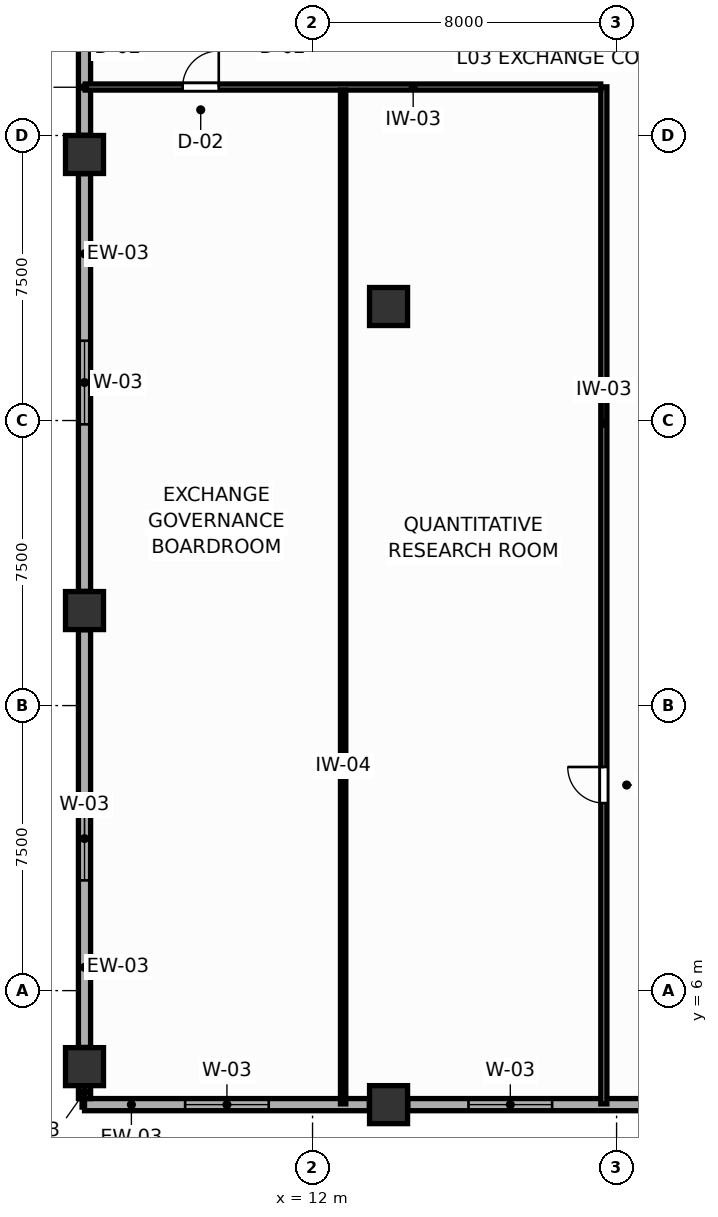
"""IFC4 building model, lengths in metres.
Left out: names, types, materials, properties, quantities, classifications, styles, units other than length and angle.
Written with IfcOpenShell. Run it as: python <this file> out.ifc"""

import sys

from ifc_helpers import new_model, si_unit, direction, frame, frame_2d, origin, origin_2d, place, context, subcontext, project, spatial, rectangle, extrude, source, transform, mapped, element, fill, save


model = new_model("IFC4")
c1 = context("Model", 3, precision=1e-05, world=origin(), true_north=direction((0.0, 1.0)))
c2 = subcontext(c1, "Body", "Model", "MODEL_VIEW")
j1 = project(units=[si_unit("LENGTHUNIT", "METRE"), si_unit("PLANEANGLEUNIT", "RADIAN")], contexts=[c1])
p1 = place(None, origin())
s1 = spatial("IfcSite", under=j1, at=p1, CompositionType="ELEMENT")
p2 = place(p1, origin())
s2 = spatial("IfcBuilding", under=s1, at=p2, CompositionType="ELEMENT")
p3 = place(p2, frame((0.0, 0.0, 14.4)))
s3 = spatial("IfcBuildingStorey", under=s2, at=p3, CompositionType="ELEMENT", Elevation=14.4)
m1 = source(origin(), c2, "Body", "SweptSolid", [
    extrude(rectangle(XDim=1.0, YDim=1.0, at=origin_2d()), origin(), (0.0, 0.0, 1.0), 4.8),
])
for number, where, z_axis, x_axis in (
    (1, (6.0, 4.0, 0.0), (0.0, 0.0, 1.0), (1.0, 0.0, 0.0)),
    (2, (6.0, 16.0, 0.0), (0.0, 0.0, 1.0), (1.0, 0.0, 0.0)),
    (3, (6.0, 28.0, 0.0), (0.0, 0.0, 1.0), (1.0, 0.0, 0.0)),
    (4, (14.0, 3.0, 0.0), (0.0, 0.0, 1.0), (1.0, 0.0, 0.0)),
    (5, (14.0, 24.0, 0.0), (0.0, 0.0, 1.0), (1.0, 0.0, 0.0)),
):
    element("IfcColumn", number, at=place(p3, frame(where, z_axis=z_axis, x_axis=x_axis)), inside=s3, PredefinedType="COLUMN", context=c2, shape_type="MappedRepresentation", body=[
        mapped(m1, transform((0.0, 0.0, 0.0), scale=1.0)),
    ])
p4 = place(p3, frame((6.0, 3.0, 0.0), z_axis=(0.0, 0.0, 1.0), x_axis=(1.0, 0.0, 0.0)))
e6 = element("IfcWall", 6, at=p4, inside=s3, PredefinedType="SOLIDWALL", context=c2, shape_type="SweptSolid", body=[
    extrude(rectangle(XDim=7.495, YDim=0.32, at=frame_2d((3.748, 0.0))), origin(), (0.0, 0.0, 1.0), 3.82),
])
p5 = place(p4, frame((2.647, 0.0, 0.75)))
e7 = element("IfcOpeningElement", 7, at=p5, cuts=e6, PredefinedType="OPENING", context=c2, shape_type="SweptSolid", body=[
    extrude(rectangle(XDim=2.2, YDim=2.0, at=frame_2d((1.1, 1.0))), frame((0.0, 0.17, 0.0), z_axis=(0.0, -1.0, 0.0), x_axis=(1.0, 0.0, 0.0)), (0.0, 0.0, 1.0), 0.34),
])
p6 = place(p3, frame((14.505, 3.0, 0.0), z_axis=(0.0, 0.0, 1.0), x_axis=(1.0, 0.0, 0.0)))
e8 = element("IfcWall", 8, at=p6, inside=s3, PredefinedType="SOLIDWALL", context=c2, shape_type="SweptSolid", body=[
    extrude(rectangle(XDim=12.59, YDim=0.32, at=frame_2d((6.295, 0.0))), origin(), (0.0, 0.0, 1.0), 3.82),
])
p7 = place(p6, frame((1.599, 0.0, 0.75)))
e9 = element("IfcOpeningElement", 9, at=p7, cuts=e8, PredefinedType="OPENING", context=c2, shape_type="SweptSolid", body=[
    extrude(rectangle(XDim=2.2, YDim=2.0, at=frame_2d((1.1, 1.0))), frame((0.0, 0.17, 0.0), z_axis=(0.0, -1.0, 0.0), x_axis=(1.0, 0.0, 0.0)), (0.0, 0.0, 1.0), 0.34),
])
p8 = place(p3, frame((6.0, 3.16, 0.0), z_axis=(0.0, 0.0, 1.0), x_axis=(0.0, 1.0, 0.0)))
e10 = element("IfcWall", 10, at=p8, inside=s3, PredefinedType="SOLIDWALL", context=c2, shape_type="SweptSolid", body=[
    extrude(rectangle(XDim=0.335, YDim=0.32, at=frame_2d((0.167, 0.0))), origin(), (0.0, 0.0, 1.0), 4.52),
])
p9 = place(p3, frame((6.0, 4.505, 0.0), z_axis=(0.0, 0.0, 1.0), x_axis=(0.0, 1.0, 0.0)))
e11 = element("IfcWall", 11, at=p9, inside=s3, PredefinedType="SOLIDWALL", context=c2, shape_type="SweptSolid", body=[
    extrude(rectangle(XDim=10.99, YDim=0.32, at=frame_2d((5.495, 0.0))), origin(), (0.0, 0.0, 1.0), 3.82),
])
p10 = place(p9, frame((4.395, 0.0, 0.75)))
e12 = element("IfcOpeningElement", 12, at=p10, cuts=e11, PredefinedType="OPENING", context=c2, shape_type="SweptSolid", body=[
    extrude(rectangle(XDim=2.2, YDim=2.0, at=frame_2d((1.1, 1.0))), frame((0.0, 0.17, 0.0), z_axis=(0.0, -1.0, 0.0), x_axis=(1.0, 0.0, 0.0)), (0.0, 0.0, 1.0), 0.34),
])
p11 = place(p3, frame((6.0, 16.505, 0.0), z_axis=(0.0, 0.0, 1.0), x_axis=(0.0, 1.0, 0.0)))
e13 = element("IfcWall", 13, at=p11, inside=s3, PredefinedType="SOLIDWALL", context=c2, shape_type="SweptSolid", body=[
    extrude(rectangle(XDim=10.99, YDim=0.32, at=frame_2d((5.495, 0.0))), origin(), (0.0, 0.0, 1.0), 3.82),
])
p12 = place(p11, frame((4.395, 0.0, 0.75)))
e14 = element("IfcOpeningElement", 14, at=p12, cuts=e13, PredefinedType="OPENING", context=c2, shape_type="SweptSolid", body=[
    extrude(rectangle(XDim=2.2, YDim=2.0, at=frame_2d((1.1, 1.0))), frame((0.0, 0.17, 0.0), z_axis=(0.0, -1.0, 0.0), x_axis=(1.0, 0.0, 0.0)), (0.0, 0.0, 1.0), 0.34),
])
p13 = place(p3, frame((6.0, 28.505, 0.0), z_axis=(0.0, 0.0, 1.0), x_axis=(0.0, 1.0, 0.0)))
e15 = element("IfcWall", 15, at=p13, inside=s3, PredefinedType="SOLIDWALL", context=c2, shape_type="SweptSolid", body=[
    extrude(rectangle(XDim=10.99, YDim=0.32, at=frame_2d((5.495, 0.0))), origin(), (0.0, 0.0, 1.0), 3.82),
])
p14 = place(p13, frame((4.395, 0.0, 0.75)))
e16 = element("IfcOpeningElement", 16, at=p14, cuts=e15, PredefinedType="OPENING", context=c2, shape_type="SweptSolid", body=[
    extrude(rectangle(XDim=2.2, YDim=2.0, at=frame_2d((1.1, 1.0))), frame((0.0, 0.17, 0.0), z_axis=(0.0, -1.0, 0.0), x_axis=(1.0, 0.0, 0.0)), (0.0, 0.0, 1.0), 0.34),
])
p15 = place(p3, frame((19.665, 3.02, 0.0), z_axis=(0.0, 0.0, 1.0), x_axis=(0.0, 1.0, 0.0)))
e17 = element("IfcWall", 17, at=p15, inside=s3, PredefinedType="PARTITIONING", context=c2, shape_type="SweptSolid", body=[
    extrude(rectangle(XDim=26.76, YDim=0.16, at=frame_2d((13.38, 0.0))), origin(), (0.0, 0.0, 1.0), 4.52),
])
p16 = place(p15, frame((7.914, 0.0, 0.0)))
e18 = element("IfcOpeningElement", 18, at=p16, cuts=e17, PredefinedType="OPENING", context=c2, shape_type="SweptSolid", body=[
    extrude(rectangle(XDim=0.95, YDim=2.05, at=frame_2d((0.475, 1.025))), frame((0.0, 0.09, 0.0), z_axis=(0.0, -1.0, 0.0), x_axis=(1.0, 0.0, 0.0)), (0.0, 0.0, 1.0), 0.18),
])
p17 = place(p3, frame((6.02, 29.775, 0.0), z_axis=(0.0, 0.0, 1.0), x_axis=(1.0, 0.0, 0.0)))
e19 = element("IfcWall", 19, at=p17, inside=s3, PredefinedType="PARTITIONING", context=c2, shape_type="SweptSolid", body=[
    extrude(rectangle(XDim=13.563, YDim=0.16, at=frame_2d((6.781, 0.0))), origin(), (0.0, 0.0, 1.0), 4.52),
])
p18 = place(p17, frame((2.562, 0.0, 0.0)))
e20 = element("IfcOpeningElement", 20, at=p18, cuts=e19, PredefinedType="OPENING", context=c2, shape_type="SweptSolid", body=[
    extrude(rectangle(XDim=0.95, YDim=2.05, at=frame_2d((0.475, 1.025))), frame((0.0, 0.09, 0.0), z_axis=(0.0, -1.0, 0.0), x_axis=(1.0, 0.0, 0.0)), (0.0, 0.0, 1.0), 0.18),
])
p19 = place(p3, frame((12.805, 3.02, 0.0), z_axis=(0.0, 0.0, 1.0), x_axis=(0.0, 1.0, 0.0)))
e21 = element("IfcWall", 21, at=p19, inside=s3, PredefinedType="PARTITIONING", context=c2, shape_type="SweptSolid", body=[
    extrude(rectangle(XDim=26.673, YDim=0.14, at=frame_2d((13.336, 0.0))), origin(), (0.0, 0.0, 1.0), 4.52),
])
p20 = place(p5, origin())
e22 = element("IfcWindow", 22, at=p20, inside=s3, PartitioningType="SINGLE_PANEL", PredefinedType="WINDOW", context=c2, shape_type="SweptSolid", body=[
    extrude(rectangle(XDim=2.2, YDim=2.0, at=frame_2d((1.1, 1.0))), frame((0.0, 0.03, 0.0), z_axis=(0.0, -1.0, 0.0), x_axis=(1.0, 0.0, 0.0)), (0.0, 0.0, 1.0), 0.06),
])
fill(e7, e22)
p21 = place(p7, origin())
e23 = element("IfcWindow", 23, at=p21, inside=s3, PartitioningType="SINGLE_PANEL", PredefinedType="WINDOW", context=c2, shape_type="SweptSolid", body=[
    extrude(rectangle(XDim=2.2, YDim=2.0, at=frame_2d((1.1, 1.0))), frame((0.0, 0.03, 0.0), z_axis=(0.0, -1.0, 0.0), x_axis=(1.0, 0.0, 0.0)), (0.0, 0.0, 1.0), 0.06),
])
fill(e9, e23)
p22 = place(p10, origin())
e24 = element("IfcWindow", 24, at=p22, inside=s3, PartitioningType="SINGLE_PANEL", PredefinedType="WINDOW", context=c2, shape_type="SweptSolid", body=[
    extrude(rectangle(XDim=2.2, YDim=2.0, at=frame_2d((1.1, 1.0))), frame((0.0, 0.03, 0.0), z_axis=(0.0, -1.0, 0.0), x_axis=(1.0, 0.0, 0.0)), (0.0, 0.0, 1.0), 0.06),
])
fill(e12, e24)
p23 = place(p12, origin())
e25 = element("IfcWindow", 25, at=p23, inside=s3, PartitioningType="SINGLE_PANEL", PredefinedType="WINDOW", context=c2, shape_type="SweptSolid", body=[
    extrude(rectangle(XDim=2.2, YDim=2.0, at=frame_2d((1.1, 1.0))), frame((0.0, 0.03, 0.0), z_axis=(0.0, -1.0, 0.0), x_axis=(1.0, 0.0, 0.0)), (0.0, 0.0, 1.0), 0.06),
])
fill(e14, e25)
p24 = place(p16, origin())
e26 = element("IfcDoor", 26, at=p24, inside=s3, OperationType="SINGLE_SWING_RIGHT", PredefinedType="DOOR", context=c2, shape_type="SweptSolid", body=[
    extrude(rectangle(XDim=0.95, YDim=2.05, at=frame_2d((0.475, 1.025))), frame((0.0, 0.025, 0.0), z_axis=(0.0, -1.0, 0.0), x_axis=(1.0, 0.0, 0.0)), (0.0, 0.0, 1.0), 0.05),
])
fill(e18, e26)
p25 = place(p18, origin())
e27 = element("IfcDoor", 27, at=p25, inside=s3, OperationType="SINGLE_SWING_RIGHT", PredefinedType="DOOR", context=c2, shape_type="SweptSolid", body=[
    extrude(rectangle(XDim=0.95, YDim=2.05, at=frame_2d((0.475, 1.025))), frame((0.0, 0.025, 0.0), z_axis=(0.0, -1.0, 0.0), x_axis=(1.0, 0.0, 0.0)), (0.0, 0.0, 1.0), 0.05),
])
fill(e20, e27)
save(model, sys.argv[1])
